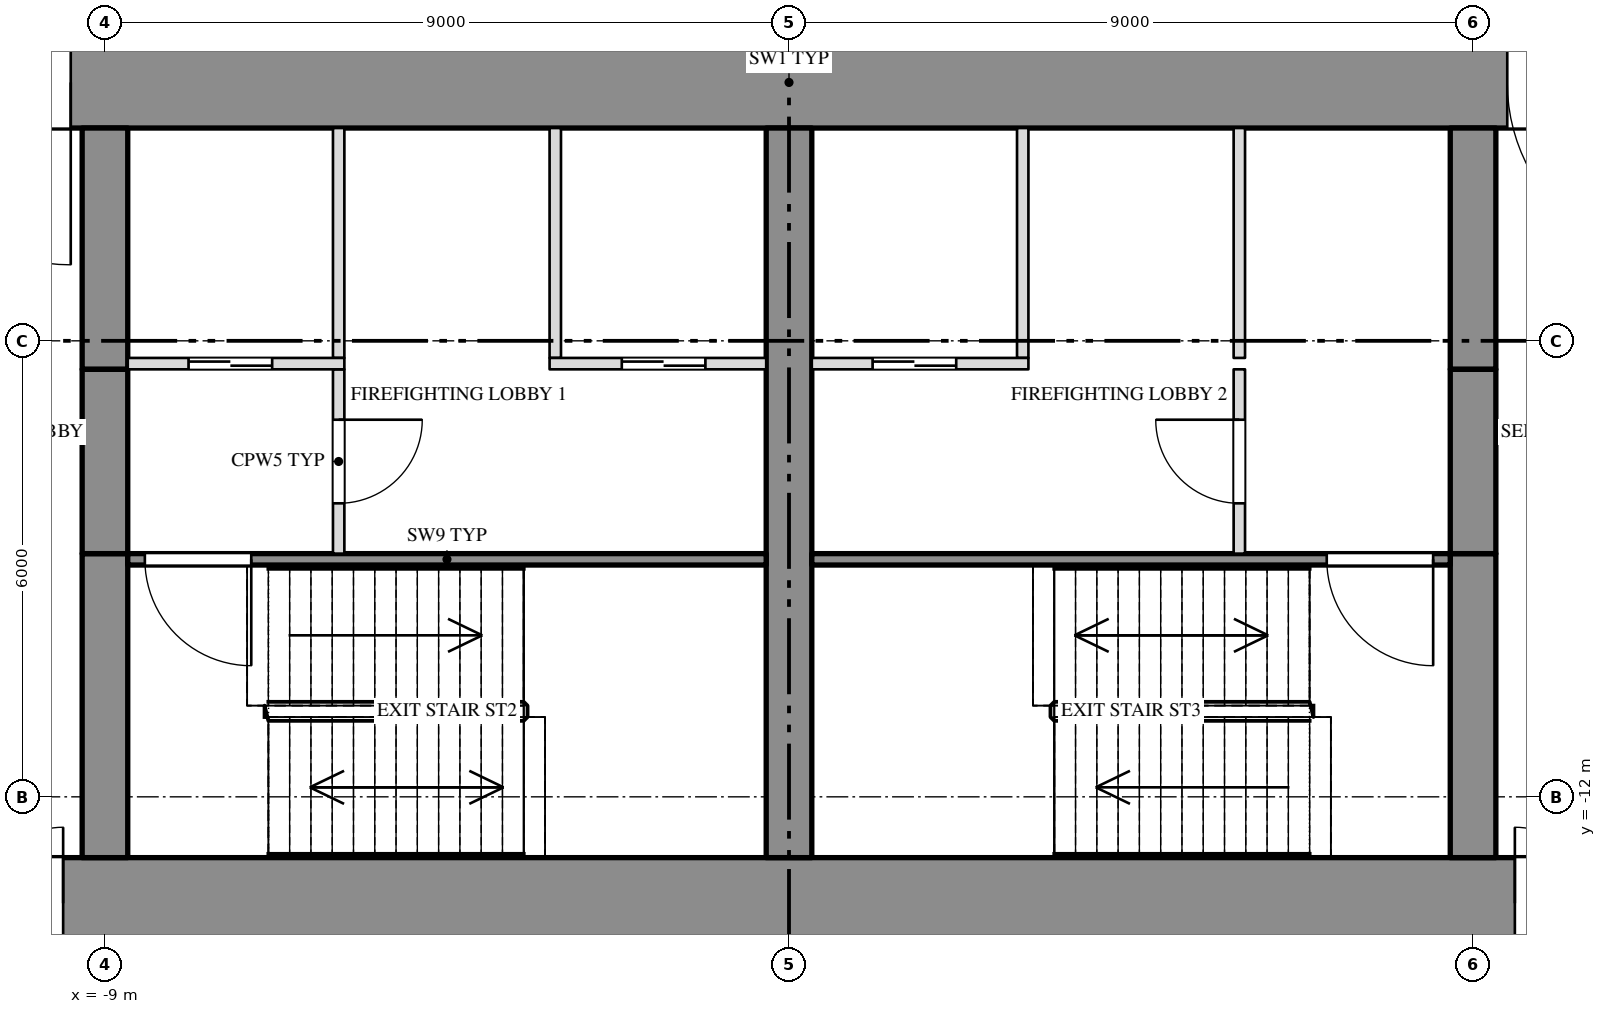
"""IFC4 building model, lengths in metres.
Left out: names, types, materials, properties, quantities, classifications, styles, units other than length and angle.
Written with IfcOpenShell. Run it as: python <this file> out.ifc"""

import sys

from ifc_helpers import new_model, si_unit, direction, frame, frame_2d, origin, place, context, subcontext, project, spatial, rectangle, extrude, element, fill, save


model = new_model("IFC4")
c1 = context("Model", 3, precision=1e-05, world=origin(), true_north=direction((0.0, 1.0)))
c2 = subcontext(c1, "Body", "Model", "MODEL_VIEW")
j1 = project(units=[si_unit("LENGTHUNIT", "METRE"), si_unit("PLANEANGLEUNIT", "RADIAN")], contexts=[c1])
p1 = place(None, origin())
s1 = spatial("IfcSite", under=j1, at=p1, CompositionType="ELEMENT")
p2 = place(p1, origin())
s2 = spatial("IfcBuilding", under=s1, at=p2, CompositionType="ELEMENT")
p3 = place(p2, frame((0.0, 0.0, 43.5)))
s3 = spatial("IfcBuildingStorey", under=s2, at=p3, CompositionType="ELEMENT", Elevation=43.5)
p4 = place(p3, frame((-27.0, -2.6, 0.0), z_axis=(0.0, 0.0, 1.0), x_axis=(1.0, 0.0, 0.0)))
e1 = element("IfcWall", 1, at=p4, inside=s3, PredefinedType="SHEAR", context=c2, shape_type="SweptSolid", body=[
    extrude(rectangle(XDim=54.0, YDim=1.2, at=frame_2d((27.0, 0.0))), origin(), (0.0, 0.0, 1.0), 4.25),
])
p5 = place(p4, frame((15.15, 0.0, 0.0)))
e2 = element("IfcOpeningElement", 2, at=p5, cuts=e1, PredefinedType="OPENING", context=c2, shape_type="SweptSolid", body=[
    extrude(rectangle(XDim=2.4, YDim=2.1, at=frame_2d((1.2, 1.05))), frame((0.0, 0.612, 0.0), z_axis=(0.0, -1.0, 0.0), x_axis=(1.0, 0.0, 0.0)), (0.0, 0.0, 1.0), 1.224),
])
p6 = place(p4, frame((36.45, 0.0, 0.0)))
e3 = element("IfcOpeningElement", 3, at=p6, cuts=e1, PredefinedType="OPENING", context=c2, shape_type="SweptSolid", body=[
    extrude(rectangle(XDim=2.4, YDim=2.1, at=frame_2d((1.2, 1.05))), frame((0.0, 0.612, 0.0), z_axis=(0.0, -1.0, 0.0), x_axis=(1.0, 0.0, 0.0)), (0.0, 0.0, 1.0), 1.224),
])
p7 = place(p3, frame((-27.0, -13.4, 0.0), z_axis=(0.0, 0.0, 1.0), x_axis=(1.0, 0.0, 0.0)))
e4 = element("IfcWall", 4, at=p7, inside=s3, PredefinedType="SHEAR", context=c2, shape_type="SweptSolid", body=[
    extrude(rectangle(XDim=54.0, YDim=1.2, at=frame_2d((27.0, 0.0))), origin(), (0.0, 0.0, 1.0), 4.25),
])
p8 = place(p7, frame((16.45, 0.0, 0.0)))
e5 = element("IfcOpeningElement", 5, at=p8, cuts=e4, PredefinedType="OPENING", context=c2, shape_type="SweptSolid", body=[
    extrude(rectangle(XDim=1.0, YDim=2.1, at=frame_2d((0.5, 1.05))), frame((0.0, 0.612, 0.0), z_axis=(0.0, -1.0, 0.0), x_axis=(1.0, 0.0, 0.0)), (0.0, 0.0, 1.0), 1.224),
])
p9 = place(p7, frame((36.55, 0.0, 0.0)))
e6 = element("IfcOpeningElement", 6, at=p9, cuts=e4, PredefinedType="OPENING", context=c2, shape_type="SweptSolid", body=[
    extrude(rectangle(XDim=1.0, YDim=2.1, at=frame_2d((0.5, 1.05))), frame((0.0, 0.612, 0.0), z_axis=(0.0, -1.0, 0.0), x_axis=(1.0, 0.0, 0.0)), (0.0, 0.0, 1.0), 1.224),
])
p10 = place(p3, frame((-9.0, -12.8, 0.0), z_axis=(0.0, 0.0, 1.0), x_axis=(0.0, 1.0, 0.0)))
e7 = element("IfcWall", 7, at=p10, inside=s3, PredefinedType="SHEAR", context=c2, shape_type="SweptSolid", body=[
    extrude(rectangle(XDim=4.0, YDim=0.6, at=frame_2d((2.0, 0.0))), origin(), (0.0, 0.0, 1.0), 4.25),
])
p11 = place(p3, frame((-9.0, -6.375, 0.0), z_axis=(0.0, 0.0, 1.0), x_axis=(0.0, 1.0, 0.0)))
e8 = element("IfcWall", 8, at=p11, inside=s3, PredefinedType="SHEAR", context=c2, shape_type="SweptSolid", body=[
    extrude(rectangle(XDim=3.175, YDim=0.6, at=frame_2d((1.587, 0.0))), origin(), (0.0, 0.0, 1.0), 4.25),
])
p12 = place(p3, frame((-9.0, -8.8, 3.6), z_axis=(0.0, 0.0, 1.0), x_axis=(0.0, 1.0, 0.0)))
e9 = element("IfcWall", 9, at=p12, inside=s3, PredefinedType="SHEAR", context=c2, shape_type="SweptSolid", body=[
    extrude(rectangle(XDim=2.425, YDim=0.6, at=frame_2d((1.212, 0.0))), origin(), (0.0, 0.0, 1.0), 0.65),
])
p13 = place(p3, frame((0.0, -12.8, 0.0), z_axis=(0.0, 0.0, 1.0), x_axis=(0.0, 1.0, 0.0)))
e10 = element("IfcWall", 10, at=p13, inside=s3, PredefinedType="SHEAR", context=c2, shape_type="SweptSolid", body=[
    extrude(rectangle(XDim=9.6, YDim=0.6, at=frame_2d((4.8, 0.0))), origin(), (0.0, 0.0, 1.0), 4.25),
])
p14 = place(p3, frame((9.0, -12.8, 0.0), z_axis=(0.0, 0.0, 1.0), x_axis=(0.0, 1.0, 0.0)))
e11 = element("IfcWall", 11, at=p14, inside=s3, PredefinedType="SHEAR", context=c2, shape_type="SweptSolid", body=[
    extrude(rectangle(XDim=4.0, YDim=0.6, at=frame_2d((2.0, 0.0))), origin(), (0.0, 0.0, 1.0), 4.25),
])
p15 = place(p3, frame((9.0, -6.375, 0.0), z_axis=(0.0, 0.0, 1.0), x_axis=(0.0, 1.0, 0.0)))
e12 = element("IfcWall", 12, at=p15, inside=s3, PredefinedType="SHEAR", context=c2, shape_type="SweptSolid", body=[
    extrude(rectangle(XDim=3.175, YDim=0.6, at=frame_2d((1.587, 0.0))), origin(), (0.0, 0.0, 1.0), 4.25),
])
p16 = place(p3, frame((9.0, -8.8, 3.6), z_axis=(0.0, 0.0, 1.0), x_axis=(0.0, 1.0, 0.0)))
e13 = element("IfcWall", 13, at=p16, inside=s3, PredefinedType="SHEAR", context=c2, shape_type="SweptSolid", body=[
    extrude(rectangle(XDim=2.425, YDim=0.6, at=frame_2d((1.212, 0.0))), origin(), (0.0, 0.0, 1.0), 0.65),
])
for number, where, z_axis, x_axis in (
    (14, (-3.075, -6.225, 0.0), (0.0, 0.0, 1.0), (0.0, 1.0, 0.0)),
    (15, (-5.925, -6.225, 0.0), (0.0, 0.0, 1.0), (0.0, 1.0, 0.0)),
    (16, (3.075, -6.225, 0.0), (0.0, 0.0, 1.0), (0.0, 1.0, 0.0)),
    (17, (5.925, -6.225, 0.0), (0.0, 0.0, 1.0), (0.0, 1.0, 0.0)),
):
    element("IfcWall", number, at=place(p3, frame(where, z_axis=z_axis, x_axis=x_axis)), inside=s3, PredefinedType="PARTITIONING", context=c2, shape_type="SweptSolid", body=[
        extrude(rectangle(XDim=3.025, YDim=0.15, at=frame_2d((1.513, 0.0))), origin(), (0.0, 0.0, 1.0), 4.25),
    ])
p17 = place(p3, frame((-5.925, -8.8, 0.0), z_axis=(0.0, 0.0, 1.0), x_axis=(0.0, 1.0, 0.0)))
e18 = element("IfcWall", 18, at=p17, inside=s3, PredefinedType="PARTITIONING", context=c2, shape_type="SweptSolid", body=[
    extrude(rectangle(XDim=2.425, YDim=0.15, at=frame_2d((1.212, 0.0))), origin(), (0.0, 0.0, 1.0), 4.25),
])
p18 = place(p17, frame((0.662, 0.0, 0.0)))
e19 = element("IfcOpeningElement", 19, at=p18, cuts=e18, PredefinedType="OPENING", context=c2, shape_type="SweptSolid", body=[
    extrude(rectangle(XDim=1.1, YDim=2.1, at=frame_2d((0.55, 1.05))), frame((0.0, 0.087, 0.0), z_axis=(0.0, -1.0, 0.0), x_axis=(1.0, 0.0, 0.0)), (0.0, 0.0, 1.0), 0.174),
])
p19 = place(p3, frame((5.925, -8.8, 0.0), z_axis=(0.0, 0.0, 1.0), x_axis=(0.0, 1.0, 0.0)))
e20 = element("IfcWall", 20, at=p19, inside=s3, PredefinedType="PARTITIONING", context=c2, shape_type="SweptSolid", body=[
    extrude(rectangle(XDim=2.425, YDim=0.15, at=frame_2d((1.212, 0.0))), origin(), (0.0, 0.0, 1.0), 4.25),
])
p20 = place(p19, frame((0.662, 0.0, 0.0)))
e21 = element("IfcOpeningElement", 21, at=p20, cuts=e20, PredefinedType="OPENING", context=c2, shape_type="SweptSolid", body=[
    extrude(rectangle(XDim=1.1, YDim=2.1, at=frame_2d((0.55, 1.05))), frame((0.0, 0.087, 0.0), z_axis=(0.0, -1.0, 0.0), x_axis=(1.0, 0.0, 0.0)), (0.0, 0.0, 1.0), 0.174),
])
p21 = place(p3, frame((-8.7, -6.3, 0.0), z_axis=(0.0, 0.0, 1.0), x_axis=(1.0, 0.0, 0.0)))
e22 = element("IfcWall", 22, at=p21, inside=s3, PredefinedType="PARTITIONING", context=c2, shape_type="SweptSolid", body=[
    extrude(rectangle(XDim=2.85, YDim=0.15, at=frame_2d((1.425, 0.0))), origin(), (0.0, 0.0, 1.0), 4.25),
])
p22 = place(p21, frame((0.8, 0.0, 0.0)))
e23 = element("IfcOpeningElement", 23, at=p22, cuts=e22, PredefinedType="OPENING", context=c2, shape_type="SweptSolid", body=[
    extrude(rectangle(XDim=1.1, YDim=2.1, at=frame_2d((0.55, 1.05))), frame((0.0, 0.087, 0.0), z_axis=(0.0, -1.0, 0.0), x_axis=(1.0, 0.0, 0.0)), (0.0, 0.0, 1.0), 0.174),
])
p23 = place(p3, frame((-3.15, -6.3, 0.0), z_axis=(0.0, 0.0, 1.0), x_axis=(1.0, 0.0, 0.0)))
e24 = element("IfcWall", 24, at=p23, inside=s3, PredefinedType="PARTITIONING", context=c2, shape_type="SweptSolid", body=[
    extrude(rectangle(XDim=2.85, YDim=0.15, at=frame_2d((1.425, 0.0))), origin(), (0.0, 0.0, 1.0), 4.25),
])
p24 = place(p23, frame((0.95, 0.0, 0.0)))
e25 = element("IfcOpeningElement", 25, at=p24, cuts=e24, PredefinedType="OPENING", context=c2, shape_type="SweptSolid", body=[
    extrude(rectangle(XDim=1.1, YDim=2.1, at=frame_2d((0.55, 1.05))), frame((0.0, 0.087, 0.0), z_axis=(0.0, -1.0, 0.0), x_axis=(1.0, 0.0, 0.0)), (0.0, 0.0, 1.0), 0.174),
])
p25 = place(p3, frame((0.3, -6.3, 0.0), z_axis=(0.0, 0.0, 1.0), x_axis=(1.0, 0.0, 0.0)))
e26 = element("IfcWall", 26, at=p25, inside=s3, PredefinedType="PARTITIONING", context=c2, shape_type="SweptSolid", body=[
    extrude(rectangle(XDim=2.85, YDim=0.15, at=frame_2d((1.425, 0.0))), origin(), (0.0, 0.0, 1.0), 4.25),
])
p26 = place(p25, frame((0.8, 0.0, 0.0)))
e27 = element("IfcOpeningElement", 27, at=p26, cuts=e26, PredefinedType="OPENING", context=c2, shape_type="SweptSolid", body=[
    extrude(rectangle(XDim=1.1, YDim=2.1, at=frame_2d((0.55, 1.05))), frame((0.0, 0.087, 0.0), z_axis=(0.0, -1.0, 0.0), x_axis=(1.0, 0.0, 0.0)), (0.0, 0.0, 1.0), 0.174),
])
p27 = place(p3, frame((-8.7, -8.875, 0.0), z_axis=(0.0, 0.0, 1.0), x_axis=(1.0, 0.0, 0.0)))
e28 = element("IfcWall", 28, at=p27, inside=s3, PredefinedType="SHEAR", context=c2, shape_type="SweptSolid", body=[
    extrude(rectangle(XDim=8.4, YDim=0.15, at=frame_2d((4.2, 0.0))), origin(), (0.0, 0.0, 1.0), 4.25),
])
p28 = place(p27, frame((0.225, 0.0, 0.0)))
e29 = element("IfcOpeningElement", 29, at=p28, cuts=e28, PredefinedType="OPENING", context=c2, shape_type="SweptSolid", body=[
    extrude(rectangle(XDim=1.4, YDim=2.1, at=frame_2d((0.7, 1.05))), frame((0.0, 0.087, 0.0), z_axis=(0.0, -1.0, 0.0), x_axis=(1.0, 0.0, 0.0)), (0.0, 0.0, 1.0), 0.174),
])
p29 = place(p3, frame((0.3, -8.875, 0.0), z_axis=(0.0, 0.0, 1.0), x_axis=(1.0, 0.0, 0.0)))
e30 = element("IfcWall", 30, at=p29, inside=s3, PredefinedType="SHEAR", context=c2, shape_type="SweptSolid", body=[
    extrude(rectangle(XDim=8.4, YDim=0.15, at=frame_2d((4.2, 0.0))), origin(), (0.0, 0.0, 1.0), 4.25),
])
p30 = place(p29, frame((6.775, 0.0, 0.0)))
e31 = element("IfcOpeningElement", 31, at=p30, cuts=e30, PredefinedType="OPENING", context=c2, shape_type="SweptSolid", body=[
    extrude(rectangle(XDim=1.4, YDim=2.1, at=frame_2d((0.7, 1.05))), frame((0.0, 0.087, 0.0), z_axis=(0.0, -1.0, 0.0), x_axis=(1.0, 0.0, 0.0)), (0.0, 0.0, 1.0), 0.174),
])
p31 = place(p5, origin())
e32 = element("IfcDoor", 32, at=p31, inside=s3, OperationType="DOUBLE_DOOR_SINGLE_SWING", PredefinedType="DOOR", context=c2, shape_type="SweptSolid", body=[
    extrude(rectangle(XDim=2.4, YDim=2.1, at=frame_2d((1.2, 1.05))), frame((0.0, 0.025, 0.0), z_axis=(0.0, -1.0, 0.0), x_axis=(1.0, 0.0, 0.0)), (0.0, 0.0, 1.0), 0.05),
])
fill(e2, e32)
p32 = place(p8, origin())
e33 = element("IfcDoor", 33, at=p32, inside=s3, OperationType="SINGLE_SWING_RIGHT", PredefinedType="DOOR", context=c2, shape_type="SweptSolid", body=[
    extrude(rectangle(XDim=1.0, YDim=2.1, at=frame_2d((0.5, 1.05))), frame((0.0, 0.025, 0.0), z_axis=(0.0, -1.0, 0.0), x_axis=(1.0, 0.0, 0.0)), (0.0, 0.0, 1.0), 0.05),
])
fill(e5, e33)
p33 = place(p28, origin())
e34 = element("IfcDoor", 34, at=p33, inside=s3, OperationType="DOUBLE_DOOR_SINGLE_SWING", PredefinedType="DOOR", context=c2, shape_type="SweptSolid", body=[
    extrude(rectangle(XDim=1.4, YDim=2.1, at=frame_2d((0.7, 1.05))), frame((0.0, 0.025, 0.0), z_axis=(0.0, -1.0, 0.0), x_axis=(1.0, 0.0, 0.0)), (0.0, 0.0, 1.0), 0.05),
])
fill(e29, e34)
p34 = place(p22, origin())
e35 = element("IfcDoor", 35, at=p34, inside=s3, OperationType="SLIDING_TO_RIGHT", PredefinedType="DOOR", context=c2, shape_type="SweptSolid", body=[
    extrude(rectangle(XDim=1.1, YDim=2.1, at=frame_2d((0.55, 1.05))), frame((0.0, 0.025, 0.0), z_axis=(0.0, -1.0, 0.0), x_axis=(1.0, 0.0, 0.0)), (0.0, 0.0, 1.0), 0.05),
])
fill(e23, e35)
p35 = place(p18, origin())
e36 = element("IfcDoor", 36, at=p35, inside=s3, OperationType="SINGLE_SWING_LEFT", PredefinedType="DOOR", context=c2, shape_type="SweptSolid", body=[
    extrude(rectangle(XDim=1.1, YDim=2.1, at=frame_2d((0.55, 1.05))), frame((0.0, 0.025, 0.0), z_axis=(0.0, -1.0, 0.0), x_axis=(1.0, 0.0, 0.0)), (0.0, 0.0, 1.0), 0.05),
])
fill(e19, e36)
p36 = place(p24, origin())
e37 = element("IfcDoor", 37, at=p36, inside=s3, OperationType="SLIDING_TO_RIGHT", PredefinedType="DOOR", context=c2, shape_type="SweptSolid", body=[
    extrude(rectangle(XDim=1.1, YDim=2.1, at=frame_2d((0.55, 1.05))), frame((0.0, 0.025, 0.0), z_axis=(0.0, -1.0, 0.0), x_axis=(1.0, 0.0, 0.0)), (0.0, 0.0, 1.0), 0.05),
])
fill(e25, e37)
p37 = place(p26, origin())
e38 = element("IfcDoor", 38, at=p37, inside=s3, OperationType="SLIDING_TO_LEFT", PredefinedType="DOOR", context=c2, shape_type="SweptSolid", body=[
    extrude(rectangle(XDim=1.1, YDim=2.1, at=frame_2d((0.55, 1.05))), frame((0.0, 0.025, 0.0), z_axis=(0.0, -1.0, 0.0), x_axis=(1.0, 0.0, 0.0)), (0.0, 0.0, 1.0), 0.05),
])
fill(e27, e38)
p38 = place(p20, origin())
e39 = element("IfcDoor", 39, at=p38, inside=s3, OperationType="SINGLE_SWING_RIGHT", PredefinedType="DOOR", context=c2, shape_type="SweptSolid", body=[
    extrude(rectangle(XDim=1.1, YDim=2.1, at=frame_2d((0.55, 1.05))), frame((0.0, 0.025, 0.0), z_axis=(0.0, -1.0, 0.0), x_axis=(1.0, 0.0, 0.0)), (0.0, 0.0, 1.0), 0.05),
])
fill(e21, e39)
p39 = place(p30, origin())
e40 = element("IfcDoor", 40, at=p39, inside=s3, OperationType="DOUBLE_DOOR_SINGLE_SWING", PredefinedType="DOOR", context=c2, shape_type="SweptSolid", body=[
    extrude(rectangle(XDim=1.4, YDim=2.1, at=frame_2d((0.7, 1.05))), frame((0.0, 0.025, 0.0), z_axis=(0.0, -1.0, 0.0), x_axis=(1.0, 0.0, 0.0)), (0.0, 0.0, 1.0), 0.05),
])
fill(e31, e40)
p40 = place(p9, origin())
e41 = element("IfcDoor", 41, at=p40, inside=s3, OperationType="SINGLE_SWING_LEFT", PredefinedType="DOOR", context=c2, shape_type="SweptSolid", body=[
    extrude(rectangle(XDim=1.0, YDim=2.1, at=frame_2d((0.5, 1.05))), frame((0.0, 0.025, 0.0), z_axis=(0.0, -1.0, 0.0), x_axis=(1.0, 0.0, 0.0)), (0.0, 0.0, 1.0), 0.05),
])
fill(e6, e41)
p41 = place(p6, origin())
e42 = element("IfcDoor", 42, at=p41, inside=s3, OperationType="DOUBLE_DOOR_SINGLE_SWING", PredefinedType="DOOR", context=c2, shape_type="SweptSolid", body=[
    extrude(rectangle(XDim=2.4, YDim=2.1, at=frame_2d((1.2, 1.05))), frame((0.0, 0.025, 0.0), z_axis=(0.0, -1.0, 0.0), x_axis=(1.0, 0.0, 0.0)), (0.0, 0.0, 1.0), 0.05),
])
fill(e3, e42)
save(model, sys.argv[1])
